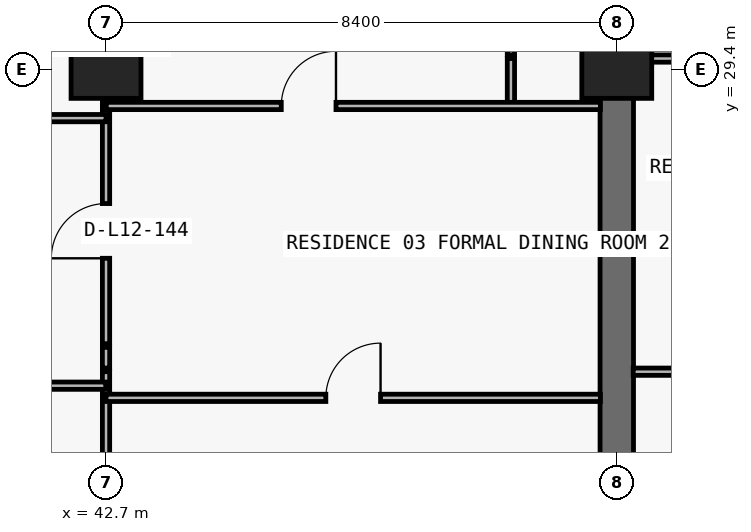
"""IFC4 building model, lengths in metres.
Left out: names, types, materials, properties, quantities, classifications, styles, units other than length and angle.
Written with IfcOpenShell. Run it as: python <this file> out.ifc"""

import sys

from ifc_helpers import new_model, si_unit, direction, frame, frame_2d, origin, origin_2d, place, context, subcontext, project, spatial, rectangle, extrude, element, fill, save


model = new_model("IFC4")
c1 = context("Model", 3, precision=1e-05, world=origin(), true_north=direction((0.0, 1.0)))
c2 = subcontext(c1, "Body", "Model", "MODEL_VIEW")
j1 = project(units=[si_unit("LENGTHUNIT", "METRE"), si_unit("PLANEANGLEUNIT", "RADIAN")], contexts=[c1])
p1 = place(None, origin())
s1 = spatial("IfcSite", under=j1, at=p1, CompositionType="ELEMENT")
p2 = place(p1, origin())
s2 = spatial("IfcBuilding", under=s1, at=p2, CompositionType="ELEMENT")
p3 = place(p2, frame((0.0, 0.0, 49.8)))
s3 = spatial("IfcBuildingStorey", under=s2, at=p3, CompositionType="ELEMENT", Elevation=49.8)
for number, where, z_axis, x_axis in (
    (1, (42.7, 29.4, 0.0), (0.0, 0.0, 1.0), (1.0, 0.0, 0.0)),
    (2, (51.1, 29.4, 0.0), (0.0, 0.0, 1.0), (1.0, 0.0, 0.0)),
):
    element("IfcColumn", number, at=place(p3, frame(where, z_axis=z_axis, x_axis=x_axis)), inside=s3, PredefinedType="COLUMN", context=c2, shape_type="SweptSolid", body=[
        extrude(rectangle(XDim=1.15, YDim=0.95, at=origin_2d()), origin(), (0.0, 0.0, 1.0), 3.05),
    ])
p4 = place(p3, frame((51.1, 20.8, 0.0), z_axis=(0.0, 0.0, 1.0), x_axis=(0.0, 1.0, 0.0)))
e3 = element("IfcWall", 3, at=p4, inside=s3, PredefinedType="SHEAR", context=c2, shape_type="SweptSolid", body=[
    extrude(rectangle(XDim=8.6, YDim=0.55, at=frame_2d((4.3, 0.0))), origin(), (0.0, 0.0, 1.0), 3.05),
])
p5 = place(p3, frame((42.7, 6.24, 0.0), z_axis=(0.0, 0.0, 1.0), x_axis=(0.0, 1.0, 0.0)))
e4 = element("IfcWall", 4, at=p5, inside=s3, PredefinedType="PARTITIONING", context=c2, shape_type="SweptSolid", body=[
    extrude(rectangle(XDim=18.19, YDim=0.12, at=frame_2d((9.095, 0.0))), origin(), (0.0, 0.0, 1.0), 2.11),
])
p6 = place(p3, frame((42.7, 24.49, 0.0), z_axis=(0.0, 0.0, 1.0), x_axis=(0.0, 1.0, 0.0)))
e5 = element("IfcWall", 5, at=p6, inside=s3, PredefinedType="PARTITIONING", context=c2, shape_type="SweptSolid", body=[
    extrude(rectangle(XDim=0.34, YDim=0.12, at=frame_2d((0.17, 0.0))), origin(), (0.0, 0.0, 1.0), 2.11),
])
p7 = place(p3, frame((42.7, 24.89, 0.0), z_axis=(0.0, 0.0, 1.0), x_axis=(0.0, 1.0, 0.0)))
e6 = element("IfcWall", 6, at=p7, inside=s3, PredefinedType="PARTITIONING", context=c2, shape_type="SweptSolid", body=[
    extrude(rectangle(XDim=4.69, YDim=0.12, at=frame_2d((2.345, 0.0))), origin(), (0.0, 0.0, 1.0), 2.11),
])
p8 = place(p7, frame((1.405, 0.0, 0.0)))
e7 = element("IfcOpeningElement", 7, at=p8, cuts=e6, PredefinedType="OPENING", context=c2, shape_type="SweptSolid", body=[
    extrude(rectangle(XDim=0.9, YDim=2.06, at=frame_2d((0.45, 1.03))), frame((0.0, 0.07, 0.0), z_axis=(0.0, -1.0, 0.0), x_axis=(1.0, 0.0, 0.0)), (0.0, 0.0, 1.0), 0.14),
])
p9 = place(p3, frame((42.7, 29.64, 0.0), z_axis=(0.0, 0.0, 1.0), x_axis=(0.0, 1.0, 0.0)))
e8 = element("IfcWall", 8, at=p9, inside=s3, PredefinedType="PARTITIONING", context=c2, shape_type="SweptSolid", body=[
    extrude(rectangle(XDim=0.34, YDim=0.12, at=frame_2d((0.17, 0.0))), origin(), (0.0, 0.0, 1.0), 2.11),
])
p10 = place(p3, frame((49.359, 28.8, 0.0), z_axis=(0.0, 0.0, 1.0), x_axis=(0.0, 1.0, 0.0)))
e9 = element("IfcWall", 9, at=p10, inside=s3, PredefinedType="PARTITIONING", context=c2, shape_type="SweptSolid", body=[
    extrude(rectangle(XDim=0.78, YDim=0.12, at=frame_2d((0.39, 0.0))), origin(), (0.0, 0.0, 1.0), 3.05),
])
p11 = place(p3, frame((49.359, 29.64, 0.0), z_axis=(0.0, 0.0, 1.0), x_axis=(0.0, 1.0, 0.0)))
e10 = element("IfcWall", 10, at=p11, inside=s3, PredefinedType="PARTITIONING", context=c2, shape_type="SweptSolid", body=[
    extrude(rectangle(XDim=0.34, YDim=0.12, at=frame_2d((0.17, 0.0))), origin(), (0.0, 0.0, 1.0), 3.05),
])
p12 = place(p3, frame((51.1, 29.64, 0.0), z_axis=(0.0, 0.0, 1.0), x_axis=(0.0, 1.0, 0.0)))
e11 = element("IfcWall", 11, at=p12, inside=s3, PredefinedType="PARTITIONING", context=c2, shape_type="SweptSolid", body=[
    extrude(rectangle(XDim=0.34, YDim=0.2, at=frame_2d((0.17, 0.0))), origin(), (0.0, 0.0, 1.0), 2.335),
])
p13 = place(p3, frame((42.7, 24.0, 0.0), z_axis=(0.0, 0.0, 1.0), x_axis=(1.0, 0.0, 0.0)))
e12 = element("IfcWall", 12, at=p13, inside=s3, PredefinedType="PARTITIONING", context=c2, shape_type="SweptSolid", body=[
    extrude(rectangle(XDim=8.13, YDim=0.12, at=frame_2d((4.065, 0.0))), origin(), (0.0, 0.0, 1.0), 3.05),
])
p14 = place(p13, frame((3.615, 0.0, 0.0)))
e13 = element("IfcOpeningElement", 13, at=p14, cuts=e12, PredefinedType="OPENING", context=c2, shape_type="SweptSolid", body=[
    extrude(rectangle(XDim=0.9, YDim=2.15, at=frame_2d((0.45, 1.075))), frame((0.0, 0.07, 0.0), z_axis=(0.0, -1.0, 0.0), x_axis=(1.0, 0.0, 0.0)), (0.0, 0.0, 1.0), 0.14),
])
p15 = place(p3, frame((35.105, 24.2, 0.0), z_axis=(0.0, 0.0, 1.0), x_axis=(1.0, 0.0, 0.0)))
e14 = element("IfcWall", 14, at=p15, inside=s3, PredefinedType="PARTITIONING", context=c2, shape_type="SweptSolid", body=[
    extrude(rectangle(XDim=7.59, YDim=0.12, at=frame_2d((3.795, 0.0))), origin(), (0.0, 0.0, 1.0), 3.05),
])
p16 = place(p15, frame((3.345, 0.0, 0.0)))
e15 = element("IfcOpeningElement", 15, at=p16, cuts=e14, PredefinedType="OPENING", context=c2, shape_type="SweptSolid", body=[
    extrude(rectangle(XDim=0.9, YDim=2.15, at=frame_2d((0.45, 1.075))), frame((0.0, 0.07, 0.0), z_axis=(0.0, -1.0, 0.0), x_axis=(1.0, 0.0, 0.0)), (0.0, 0.0, 1.0), 0.14),
])
p17 = place(p3, frame((51.37, 24.43, 0.0), z_axis=(0.0, 0.0, 1.0), x_axis=(1.0, 0.0, 0.0)))
e16 = element("IfcWall", 16, at=p17, inside=s3, PredefinedType="PARTITIONING", context=c2, shape_type="SweptSolid", body=[
    extrude(rectangle(XDim=8.13, YDim=0.12, at=frame_2d((4.065, 0.0))), origin(), (0.0, 0.0, 1.0), 3.05),
])
p18 = place(p17, frame((1.558, 0.0, 0.0)))
e17 = element("IfcOpeningElement", 17, at=p18, cuts=e16, PredefinedType="OPENING", context=c2, shape_type="SweptSolid", body=[
    extrude(rectangle(XDim=0.9, YDim=2.15, at=frame_2d((0.45, 1.075))), frame((0.0, 0.07, 0.0), z_axis=(0.0, -1.0, 0.0), x_axis=(1.0, 0.0, 0.0)), (0.0, 0.0, 1.0), 0.14),
])
p19 = place(p17, frame((5.79, 0.0, 0.0)))
e18 = element("IfcOpeningElement", 18, at=p19, cuts=e16, PredefinedType="OPENING", context=c2, shape_type="SweptSolid", body=[
    extrude(rectangle(XDim=0.9, YDim=2.15, at=frame_2d((0.45, 1.075))), frame((0.0, 0.07, 0.0), z_axis=(0.0, -1.0, 0.0), x_axis=(1.0, 0.0, 0.0)), (0.0, 0.0, 1.0), 0.14),
])
p20 = place(p3, frame((35.1, 28.6, 0.0), z_axis=(0.0, 0.0, 1.0), x_axis=(1.0, 0.0, 0.0)))
e19 = element("IfcWall", 19, at=p20, inside=s3, PredefinedType="PARTITIONING", context=c2, shape_type="SweptSolid", body=[
    extrude(rectangle(XDim=7.6, YDim=0.12, at=frame_2d((3.8, 0.0))), origin(), (0.0, 0.0, 1.0), 3.05),
])
p21 = place(p20, frame((2.55, 0.0, 0.0)))
e20 = element("IfcOpeningElement", 20, at=p21, cuts=e19, PredefinedType="OPENING", context=c2, shape_type="SweptSolid", body=[
    extrude(rectangle(XDim=0.9, YDim=2.15, at=frame_2d((0.45, 1.075))), frame((0.0, 0.07, 0.0), z_axis=(0.0, -1.0, 0.0), x_axis=(1.0, 0.0, 0.0)), (0.0, 0.0, 1.0), 0.14),
])
p22 = place(p3, frame((42.705, 28.8, 0.0), z_axis=(0.0, 0.0, 1.0), x_axis=(1.0, 0.0, 0.0)))
e21 = element("IfcWall", 21, at=p22, inside=s3, PredefinedType="PARTITIONING", context=c2, shape_type="SweptSolid", body=[
    extrude(rectangle(XDim=8.125, YDim=0.12, at=frame_2d((4.062, 0.0))), origin(), (0.0, 0.0, 1.0), 3.05),
])
p23 = place(p22, frame((2.877, 0.0, 0.0)))
e22 = element("IfcOpeningElement", 22, at=p23, cuts=e21, PredefinedType="OPENING", context=c2, shape_type="SweptSolid", body=[
    extrude(rectangle(XDim=0.9, YDim=2.15, at=frame_2d((0.45, 1.075))), frame((0.0, 0.07, 0.0), z_axis=(0.0, -1.0, 0.0), x_axis=(1.0, 0.0, 0.0)), (0.0, 0.0, 1.0), 0.14),
])
p24 = place(p3, frame((51.1, 29.58, 0.0), z_axis=(0.0, 0.0, 1.0), x_axis=(1.0, 0.0, 0.0)))
e23 = element("IfcWall", 23, at=p24, inside=s3, PredefinedType="PARTITIONING", context=c2, shape_type="SweptSolid", body=[
    extrude(rectangle(XDim=8.4, YDim=0.12, at=frame_2d((4.2, 0.0))), origin(), (0.0, 0.0, 1.0), 2.11),
])
p25 = place(p24, frame((1.693, 0.0, 0.0)))
e24 = element("IfcOpeningElement", 24, at=p25, cuts=e23, PredefinedType="OPENING", context=c2, shape_type="SweptSolid", body=[
    extrude(rectangle(XDim=0.9, YDim=2.06, at=frame_2d((0.45, 1.03))), frame((0.0, 0.07, 0.0), z_axis=(0.0, -1.0, 0.0), x_axis=(1.0, 0.0, 0.0)), (0.0, 0.0, 1.0), 0.14),
])
p26 = place(p8, origin())
e25 = element("IfcDoor", 25, at=p26, inside=s3, OperationType="SINGLE_SWING_LEFT", PredefinedType="DOOR", context=c2, shape_type="SweptSolid", body=[
    extrude(rectangle(XDim=0.9, YDim=2.06, at=frame_2d((0.45, 1.03))), frame((0.0, 0.025, 0.0), z_axis=(0.0, -1.0, 0.0), x_axis=(1.0, 0.0, 0.0)), (0.0, 0.0, 1.0), 0.05),
])
fill(e7, e25)
p27 = place(p23, origin())
e26 = element("IfcDoor", 26, at=p27, inside=s3, OperationType="SINGLE_SWING_RIGHT", PredefinedType="DOOR", context=c2, shape_type="SweptSolid", body=[
    extrude(rectangle(XDim=0.9, YDim=2.15, at=frame_2d((0.45, 1.075))), frame((0.0, 0.025, 0.0), z_axis=(0.0, -1.0, 0.0), x_axis=(1.0, 0.0, 0.0)), (0.0, 0.0, 1.0), 0.05),
])
fill(e22, e26)
p28 = place(p14, origin())
e27 = element("IfcDoor", 27, at=p28, inside=s3, OperationType="SINGLE_SWING_RIGHT", PredefinedType="DOOR", context=c2, shape_type="SweptSolid", body=[
    extrude(rectangle(XDim=0.9, YDim=2.15, at=frame_2d((0.45, 1.075))), frame((0.0, 0.025, 0.0), z_axis=(0.0, -1.0, 0.0), x_axis=(1.0, 0.0, 0.0)), (0.0, 0.0, 1.0), 0.05),
])
fill(e13, e27)
save(model, sys.argv[1])
